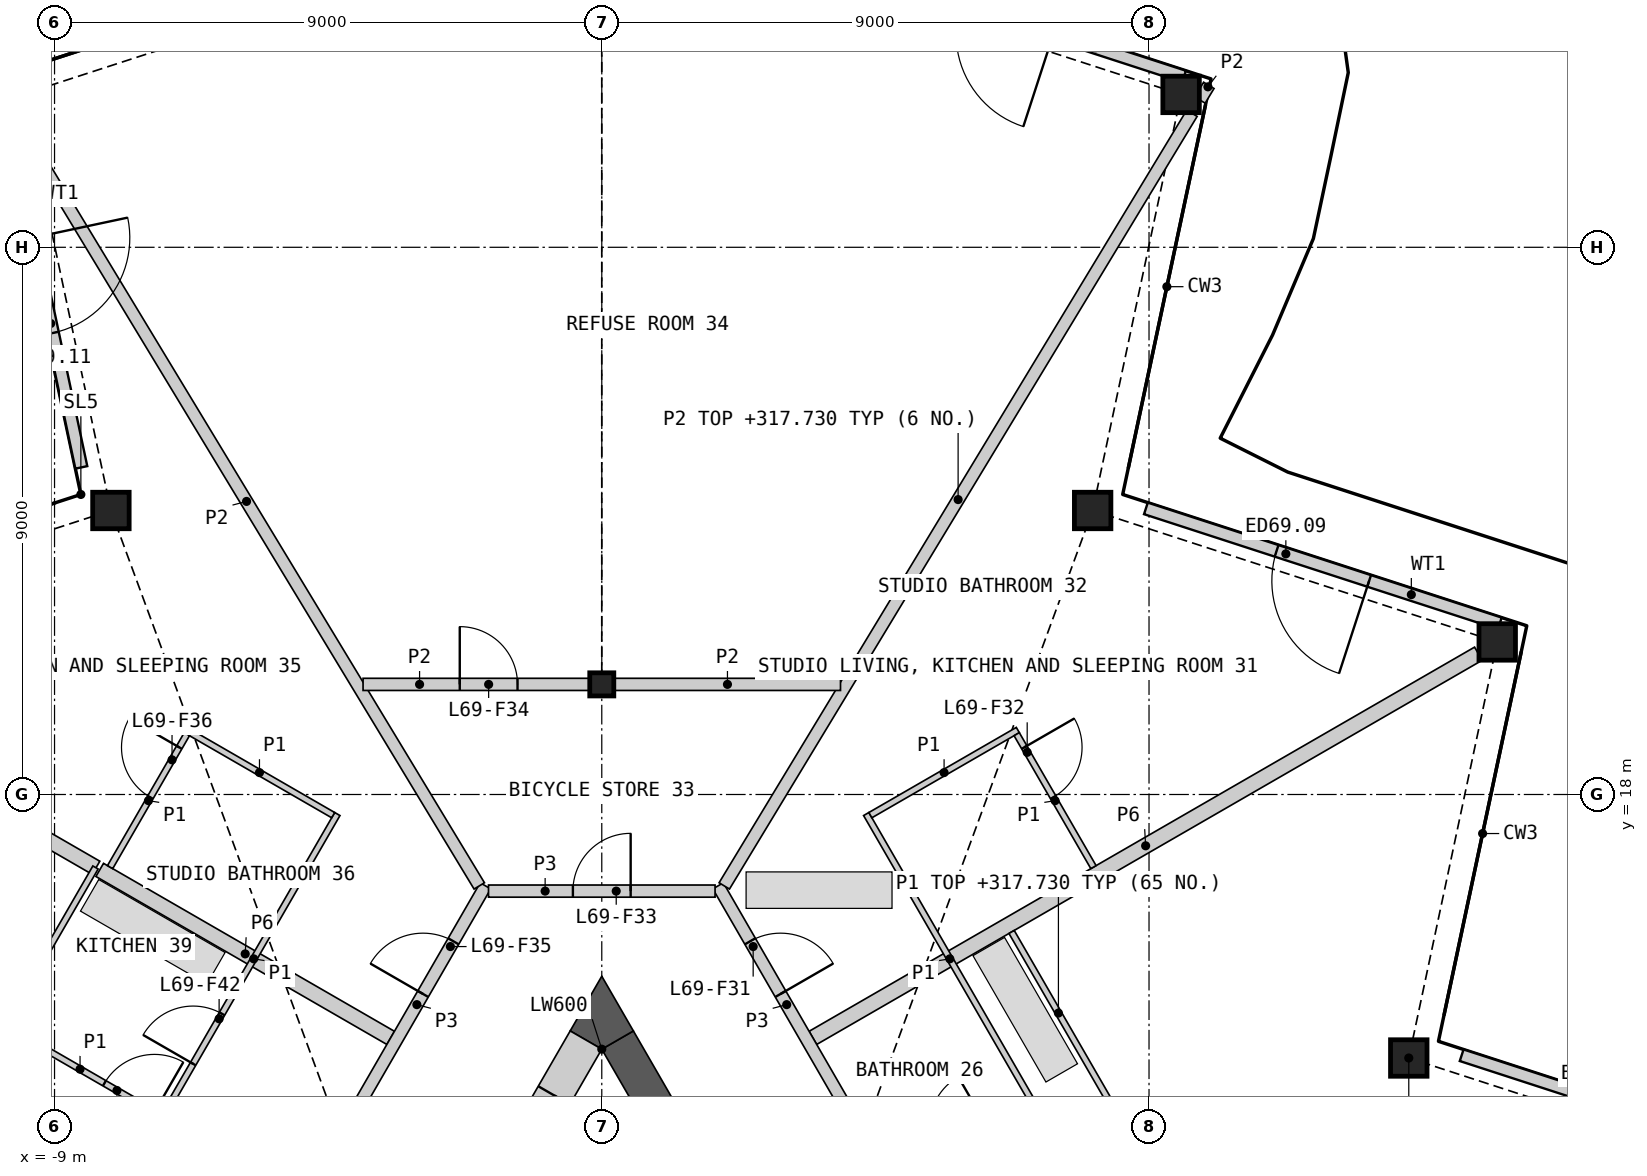
"""IFC4 building model, lengths in metres.
Left out: names, types, materials, properties, quantities, classifications, styles, units other than length and angle.
Written with IfcOpenShell. Run it as: python <this file> out.ifc"""

import sys

from ifc_helpers import new_model, si_unit, direction, frame, frame_2d, origin, origin_2d, place, context, subcontext, project, spatial, polyline, rectangle, hollow_rectangle, i_section, outline, extrude, element, fill, save


model = new_model("IFC4")
c1 = context("Model", 3, precision=1e-05, world=origin(), true_north=direction((0.0, 1.0)))
c2 = subcontext(c1, "Body", "Model", "MODEL_VIEW")
j1 = project(units=[si_unit("LENGTHUNIT", "METRE"), si_unit("PLANEANGLEUNIT", "RADIAN")], contexts=[c1])
p1 = place(None, origin())
s1 = spatial("IfcSite", under=j1, at=p1, CompositionType="ELEMENT")
p2 = place(p1, origin())
s2 = spatial("IfcBuilding", under=s1, at=p2, CompositionType="ELEMENT")
p3 = place(p2, frame((0.0, 0.0, 315.4)))
s3 = spatial("IfcBuildingStorey", under=s2, at=p3, CompositionType="ELEMENT", Elevation=315.4)
for number, where, z_axis, x_axis in (
    (1, (13.272, 13.666, 0.0), (0.0, 0.0, 1.0), (1.0, 0.0, 0.0)),
    (2, (14.727, 20.509, 0.0), (0.0, 0.0, 1.0), (1.0, 0.0, 0.0)),
    (3, (8.073, 22.671, 0.0), (0.0, 0.0, 1.0), (1.0, 0.0, 0.0)),
    (4, (9.527, 29.514, 0.0), (0.0, 0.0, 1.0), (1.0, 0.0, 0.0)),
    (5, (-8.073, 22.671, 0.0), (0.0, 0.0, 1.0), (1.0, 0.0, 0.0)),
):
    element("IfcColumn", number, at=place(p3, frame(where, z_axis=z_axis, x_axis=x_axis)), inside=s3, PredefinedType="COLUMN", context=c2, shape_type="SweptSolid", body=[
        extrude(hollow_rectangle(XDim=0.6, YDim=0.6, WallThickness=0.04, at=origin_2d()), origin(), (0.0, 0.0, 1.0), 3.4),
    ])
p4 = place(p3, frame((0.0, 19.811, 0.0), z_axis=(0.0, 0.0, 1.0), x_axis=(1.0, 0.0, 0.0)))
e6 = element("IfcColumn", 6, at=p4, inside=s3, PredefinedType="COLUMN", context=c2, shape_type="SweptSolid", body=[
    extrude(i_section(OverallWidth=0.396, OverallDepth=0.381, WebThickness=0.019, FlangeThickness=0.03, at=origin_2d()), origin(), (0.0, 0.0, 1.0), 3.4),
])
p5 = place(p3, frame((19.962, 11.82, 0.0), z_axis=(0.0, 0.0, 1.0), x_axis=(-0.951053709789, 0.309025631781, 0.0)))
e7 = element("IfcWall", 7, at=p5, inside=s3, PredefinedType="SOLIDWALL", context=c2, shape_type="SweptSolid", body=[
    extrude(rectangle(XDim=6.12, YDim=0.2, at=frame_2d((3.06, 0.0))), origin(), (0.0, 0.0, 1.0), 2.488),
])
p6 = place(p5, frame((2.26, 0.0, 0.0)))
e8 = element("IfcOpeningElement", 8, at=p6, cuts=e7, PredefinedType="OPENING", context=c2, shape_type="SweptSolid", body=[
    extrude(rectangle(XDim=1.6, YDim=2.25, at=frame_2d((0.8, 1.125))), frame((0.0, 0.11, 0.0), z_axis=(0.0, -1.0, 0.0), x_axis=(1.0, 0.0, 0.0)), (0.0, 0.0, 1.0), 0.22),
])
p7 = place(p3, frame((14.769, 20.814, 0.0), z_axis=(0.0, 0.0, 1.0), x_axis=(-0.951069243123, 0.308977822483, 0.0)))
e9 = element("IfcWall", 9, at=p7, inside=s3, PredefinedType="SOLIDWALL", context=c2, shape_type="SweptSolid", body=[
    extrude(rectangle(XDim=6.12, YDim=0.2, at=frame_2d((3.06, 0.0))), origin(), (0.0, 0.0, 1.0), 2.488),
])
p8 = place(p7, frame((2.26, 0.0, 0.0)))
e10 = element("IfcOpeningElement", 10, at=p8, cuts=e9, PredefinedType="OPENING", context=c2, shape_type="SweptSolid", body=[
    extrude(rectangle(XDim=1.6, YDim=2.25, at=frame_2d((0.8, 1.125))), frame((0.0, 0.11, 0.0), z_axis=(0.0, -1.0, 0.0), x_axis=(1.0, 0.0, 0.0)), (0.0, 0.0, 1.0), 0.22),
])
p9 = place(p3, frame((9.576, 29.809, 0.0), z_axis=(0.0, 0.0, 1.0), x_axis=(-0.951053709789, 0.309025631781, 0.0)))
e11 = element("IfcWall", 11, at=p9, inside=s3, PredefinedType="SOLIDWALL", context=c2, shape_type="SweptSolid", body=[
    extrude(rectangle(XDim=6.12, YDim=0.2, at=frame_2d((3.06, 0.0))), origin(), (0.0, 0.0, 1.0), 2.488),
])
p10 = place(p9, frame((2.26, 0.0, 0.0)))
e12 = element("IfcOpeningElement", 12, at=p10, cuts=e11, PredefinedType="OPENING", context=c2, shape_type="SweptSolid", body=[
    extrude(rectangle(XDim=1.6, YDim=2.25, at=frame_2d((0.8, 1.125))), frame((0.0, 0.11, 0.0), z_axis=(0.0, -1.0, 0.0), x_axis=(1.0, 0.0, 0.0)), (0.0, 0.0, 1.0), 0.22),
])
p11 = place(p3, frame((-9.832, 29.366, 0.0), z_axis=(0.0, 0.0, 1.0), x_axis=(0.207932234858, -0.978143233738, 0.0)))
e13 = element("IfcWall", 13, at=p11, inside=s3, PredefinedType="SOLIDWALL", context=c2, shape_type="SweptSolid", body=[
    extrude(rectangle(XDim=6.12, YDim=0.2, at=frame_2d((3.06, 0.0))), origin(), (0.0, 0.0, 1.0), 2.488),
])
p12 = place(p11, frame((2.26, 0.0, 0.0)))
e14 = element("IfcOpeningElement", 14, at=p12, cuts=e13, PredefinedType="OPENING", context=c2, shape_type="SweptSolid", body=[
    extrude(rectangle(XDim=1.6, YDim=2.25, at=frame_2d((0.8, 1.125))), frame((0.0, 0.11, 0.0), z_axis=(0.0, -1.0, 0.0), x_axis=(1.0, 0.0, 0.0)), (0.0, 0.0, 1.0), 0.22),
])
p13 = place(p3, frame((2.361, 10.322, 0.0), z_axis=(0.0, 0.0, 1.0), x_axis=(-0.500000735859, 0.866024978935, 0.0)))
e15 = element("IfcWall", 15, at=p13, inside=s3, PredefinedType="SHEAR", context=c2, shape_type="SweptSolid", body=[
    extrude(rectangle(XDim=4.202, YDim=0.6, at=frame_2d((2.101, 0.0))), origin(), (0.0, 0.0, 1.0), 3.1),
])
p14 = place(p3, origin())
e16 = element("IfcWall", 16, at=p14, inside=s3, PredefinedType="SHEAR", context=c2, shape_type="SweptSolid", body=[
    extrude(outline(polyline([(0.0, 13.811), (-0.52, 14.111), (0.0, 15.011), (0.52, 14.111), (0.0, 13.811)])), origin(), (0.0, 0.0, 1.0), 3.1),
])
p15 = place(p3, frame((-0.26, 13.961, 0.0), z_axis=(0.0, 0.0, 1.0), x_axis=(-0.49997936161, -0.866037319036, 0.0)))
e17 = element("IfcWall", 17, at=p15, inside=s3, PredefinedType="SHEAR", context=c2, shape_type="SweptSolid", body=[
    extrude(rectangle(XDim=2.66, YDim=0.6, at=frame_2d((1.33, 0.0))), origin(), (0.0, 0.0, 1.0), 3.1),
])
p16 = place(p15, frame((1.05, 0.0, 0.0)))
e18 = element("IfcOpeningElement", 18, at=p16, cuts=e17, PredefinedType="OPENING", context=c2, shape_type="SweptSolid", body=[
    extrude(rectangle(XDim=1.0, YDim=2.1, at=frame_2d((0.5, 1.05))), frame((0.0, 0.31, 0.0), z_axis=(0.0, -1.0, 0.0), x_axis=(1.0, 0.0, 0.0)), (0.0, 0.0, 1.0), 0.62),
])
p17 = place(p3, frame((3.472, 13.997, 0.0), z_axis=(0.0, 0.0, 1.0), x_axis=(0.866029233976, 0.499993365855, 0.0)))
e19 = element("IfcWall", 19, at=p17, inside=s3, PredefinedType="PARTITIONING", context=c2, shape_type="SweptSolid", body=[
    extrude(rectangle(XDim=12.637, YDim=0.25, at=frame_2d((6.319, 0.0))), origin(), (0.0, 0.0, 1.0), 2.33),
])
p18 = place(p3, frame((-14.417, 20.316, 0.0), z_axis=(0.0, 0.0, 1.0), x_axis=(0.866022207469, -0.50000553614, 0.0)))
e20 = element("IfcWall", 20, at=p18, inside=s3, PredefinedType="PARTITIONING", context=c2, shape_type="SweptSolid", body=[
    extrude(rectangle(XDim=7.042, YDim=0.25, at=frame_2d((3.521, 0.0))), origin(), (0.0, 0.0, 1.0), 2.33),
])
p19 = place(p3, frame((-8.257, 16.76, 0.0), z_axis=(0.0, 0.0, 1.0), x_axis=(0.866034739526, -0.499983829672, 0.0)))
e21 = element("IfcWall", 21, at=p19, inside=s3, PredefinedType="PARTITIONING", context=c2, shape_type="SweptSolid", body=[
    extrude(rectangle(XDim=5.525, YDim=0.25, at=frame_2d((2.763, 0.0))), origin(), (0.0, 0.0, 1.0), 2.33),
])
p20 = place(p3, frame((1.913, 16.498, 0.0), z_axis=(0.0, 0.0, 1.0), x_axis=(0.499950370306, -0.866054055606, 0.0)))
e22 = element("IfcWall", 22, at=p20, inside=s3, PredefinedType="PARTITIONING", context=c2, shape_type="SweptSolid", body=[
    extrude(rectangle(XDim=4.513, YDim=0.2, at=frame_2d((2.256, 0.0))), origin(), (0.0, 0.0, 1.0), 3.1),
])
p21 = place(p20, frame((1.053, 0.0, 0.0)))
e23 = element("IfcOpeningElement", 23, at=p21, cuts=e22, PredefinedType="OPENING", context=c2, shape_type="SweptSolid", body=[
    extrude(rectangle(XDim=1.0, YDim=2.1, at=frame_2d((0.5, 1.05))), frame((0.0, 0.11, 0.0), z_axis=(0.0, -1.0, 0.0), x_axis=(1.0, 0.0, 0.0)), (0.0, 0.0, 1.0), 0.22),
])
p22 = place(p3, frame((-4.169, 12.59, 0.0), z_axis=(0.0, 0.0, 1.0), x_axis=(0.499950370306, 0.866054055606, 0.0)))
e24 = element("IfcWall", 24, at=p22, inside=s3, PredefinedType="PARTITIONING", context=c2, shape_type="SweptSolid", body=[
    extrude(rectangle(XDim=4.513, YDim=0.2, at=frame_2d((2.256, 0.0))), origin(), (0.0, 0.0, 1.0), 3.1),
])
p23 = place(p22, frame((2.459, 0.0, 0.0)))
e25 = element("IfcOpeningElement", 25, at=p23, cuts=e24, PredefinedType="OPENING", context=c2, shape_type="SweptSolid", body=[
    extrude(rectangle(XDim=1.0, YDim=2.1, at=frame_2d((0.5, 1.05))), frame((0.0, 0.11, 0.0), z_axis=(0.0, -1.0, 0.0), x_axis=(1.0, 0.0, 0.0)), (0.0, 0.0, 1.0), 0.22),
])
p24 = place(p3, frame((-1.863, 16.411, 0.0), z_axis=(0.0, 0.0, 1.0), x_axis=(1.0, 0.0, 0.0)))
e26 = element("IfcWall", 26, at=p24, inside=s3, PredefinedType="PARTITIONING", context=c2, shape_type="SweptSolid", body=[
    extrude(rectangle(XDim=3.726, YDim=0.2, at=frame_2d((1.863, 0.0))), origin(), (0.0, 0.0, 1.0), 3.1),
])
p25 = place(p24, frame((1.388, 0.0, 0.0)))
e27 = element("IfcOpeningElement", 27, at=p25, cuts=e26, PredefinedType="OPENING", context=c2, shape_type="SweptSolid", body=[
    extrude(rectangle(XDim=0.95, YDim=2.1, at=frame_2d((0.475, 1.05))), frame((0.0, 0.11, 0.0), z_axis=(0.0, -1.0, 0.0), x_axis=(1.0, 0.0, 0.0)), (0.0, 0.0, 1.0), 0.22),
])
p26 = place(p3, frame((2.015, 16.497, 0.0), z_axis=(0.0, 0.0, 1.0), x_axis=(0.517779253395, 0.855514257482, 0.0)))
e28 = element("IfcWall", 28, at=p26, inside=s3, PredefinedType="PARTITIONING", context=c2, shape_type="SweptSolid", body=[
    extrude(rectangle(XDim=14.854, YDim=0.2, at=frame_2d((7.427, 0.0))), origin(), (0.0, 0.0, 1.0), 2.33),
])
p27 = place(p3, frame((-9.669, 29.144, 0.0), z_axis=(0.0, 0.0, 1.0), x_axis=(0.517770554559, -0.85551952218, 0.0)))
e29 = element("IfcWall", 29, at=p27, inside=s3, PredefinedType="PARTITIONING", context=c2, shape_type="SweptSolid", body=[
    extrude(rectangle(XDim=14.784, YDim=0.2, at=frame_2d((7.392, 0.0))), origin(), (0.0, 0.0, 1.0), 2.33),
])
p28 = place(p3, frame((-3.926, 19.811, 0.0), z_axis=(0.0, 0.0, 1.0), x_axis=(1.0, 0.0, 0.0)))
e30 = element("IfcWall", 30, at=p28, inside=s3, PredefinedType="PARTITIONING", context=c2, shape_type="SweptSolid", body=[
    extrude(rectangle(XDim=3.718, YDim=0.2, at=frame_2d((1.859, 0.0))), origin(), (0.0, 0.0, 1.0), 2.33),
])
p29 = place(p28, frame((1.59, 0.0, 0.0)))
e31 = element("IfcOpeningElement", 31, at=p29, cuts=e30, PredefinedType="OPENING", context=c2, shape_type="SweptSolid", body=[
    extrude(rectangle(XDim=0.95, YDim=2.1, at=frame_2d((0.475, 1.05))), frame((0.0, 0.11, 0.0), z_axis=(0.0, -1.0, 0.0), x_axis=(1.0, 0.0, 0.0)), (0.0, 0.0, 1.0), 0.22),
])
p30 = place(p3, frame((0.208, 19.811, 0.0), z_axis=(0.0, 0.0, 1.0), x_axis=(1.0, 0.0, 0.0)))
e32 = element("IfcWall", 32, at=p30, inside=s3, PredefinedType="PARTITIONING", context=c2, shape_type="SweptSolid", body=[
    extrude(rectangle(XDim=3.718, YDim=0.2, at=frame_2d((1.859, 0.0))), origin(), (0.0, 0.0, 1.0), 2.33),
])
p31 = place(p3, frame((9.837, 29.422, 0.0), z_axis=(0.0, 0.0, 1.0), x_axis=(0.517419338909, 0.855731983581, 0.0)))
e33 = element("IfcWall", 33, at=p31, inside=s3, PredefinedType="PARTITIONING", context=c2, shape_type="SweptSolid", body=[
    extrude(rectangle(XDim=0.282, YDim=0.2, at=frame_2d((0.141, 0.0))), origin(), (0.0, 0.0, 1.0), 2.33),
])
p32 = place(p3, frame((6.74, 15.739, 0.0), z_axis=(0.0, 0.0, 1.0), x_axis=(0.499995022685, -0.86602827742, 0.0)))
e34 = element("IfcWall", 34, at=p32, inside=s3, PredefinedType="PARTITIONING", context=c2, shape_type="SweptSolid", body=[
    extrude(rectangle(XDim=15.404, YDim=0.1, at=frame_2d((7.702, 0.0))), origin(), (0.0, 0.0, 1.0), 2.33),
])
p33 = place(p32, frame((8.582, 0.0, 0.0)))
e35 = element("IfcOpeningElement", 35, at=p33, cuts=e34, PredefinedType="OPENING", context=c2, shape_type="SweptSolid", body=[
    extrude(rectangle(XDim=0.95, YDim=2.1, at=frame_2d((0.475, 1.05))), frame((0.0, 0.06, 0.0), z_axis=(0.0, -1.0, 0.0), x_axis=(1.0, 0.0, 0.0)), (0.0, 0.0, 1.0), 0.12),
])
p34 = place(p3, frame((-13.544, 7.762, 0.0), z_axis=(0.0, 0.0, 1.0), x_axis=(0.499993819111, 0.866028972293, 0.0)))
e36 = element("IfcWall", 36, at=p34, inside=s3, PredefinedType="PARTITIONING", context=c2, shape_type="SweptSolid", body=[
    extrude(rectangle(XDim=10.436, YDim=0.1, at=frame_2d((5.218, 0.0))), origin(), (0.0, 0.0, 1.0), 2.33),
])
p35 = place(p34, frame((3.279, 0.0, 0.0)))
e37 = element("IfcOpeningElement", 37, at=p35, cuts=e36, PredefinedType="OPENING", context=c2, shape_type="SweptSolid", body=[
    extrude(rectangle(XDim=0.95, YDim=2.1, at=frame_2d((0.475, 1.05))), frame((0.0, 0.06, 0.0), z_axis=(0.0, -1.0, 0.0), x_axis=(1.0, 0.0, 0.0)), (0.0, 0.0, 1.0), 0.12),
])
p36 = place(p3, frame((-9.783, 14.177, 0.0), z_axis=(0.0, 0.0, 1.0), x_axis=(0.866030435321, -0.499991285022, 0.0)))
e38 = element("IfcWall", 38, at=p36, inside=s3, PredefinedType="PARTITIONING", context=c2, shape_type="SweptSolid", body=[
    extrude(rectangle(XDim=5.555, YDim=0.1, at=frame_2d((2.778, 0.0))), origin(), (0.0, 0.0, 1.0), 2.33),
])
p37 = place(p36, frame((1.852, 0.0, 0.0)))
e39 = element("IfcOpeningElement", 39, at=p37, cuts=e38, PredefinedType="OPENING", context=c2, shape_type="SweptSolid", body=[
    extrude(rectangle(XDim=0.95, YDim=2.1, at=frame_2d((0.475, 1.05))), frame((0.0, 0.06, 0.0), z_axis=(0.0, -1.0, 0.0), x_axis=(1.0, 0.0, 0.0)), (0.0, 0.0, 1.0), 0.12),
])
p38 = place(p3, frame((4.349, 17.679, 0.0), z_axis=(0.0, 0.0, 1.0), x_axis=(0.49997732567, -0.866038494419, 0.0)))
e40 = element("IfcWall", 40, at=p38, inside=s3, PredefinedType="PARTITIONING", context=c2, shape_type="SweptSolid", body=[
    extrude(rectangle(XDim=5.5, YDim=0.1, at=frame_2d((2.75, 0.0))), origin(), (0.0, 0.0, 1.0), 2.33),
])
p39 = place(p3, frame((-7.099, 12.915, 0.0), z_axis=(0.0, 0.0, 1.0), x_axis=(0.49997732567, 0.866038494419, 0.0)))
e41 = element("IfcWall", 41, at=p39, inside=s3, PredefinedType="PARTITIONING", context=c2, shape_type="SweptSolid", body=[
    extrude(rectangle(XDim=5.5, YDim=0.1, at=frame_2d((2.75, 0.0))), origin(), (0.0, 0.0, 1.0), 2.33),
])
p40 = place(p39, frame((0.756, 0.0, 0.0)))
e42 = element("IfcOpeningElement", 42, at=p40, cuts=e41, PredefinedType="OPENING", context=c2, shape_type="SweptSolid", body=[
    extrude(rectangle(XDim=0.95, YDim=2.1, at=frame_2d((0.475, 1.05))), frame((0.0, 0.06, 0.0), z_axis=(0.0, -1.0, 0.0), x_axis=(1.0, 0.0, 0.0)), (0.0, 0.0, 1.0), 0.12),
])
for number, where, z_axis, x_axis in (
    (43, (4.417, 17.66, 0.0), (0.0, 0.0, 1.0), (0.866, 0.5, 0.0)),
    (44, (-6.842, 19.06, 0.0), (0.0, 0.0, 1.0), (0.866, -0.5, 0.0)),
):
    element("IfcWall", number, at=place(p3, frame(where, z_axis=z_axis, x_axis=x_axis)), inside=s3, PredefinedType="PARTITIONING", context=c2, shape_type="SweptSolid", body=[
        extrude(rectangle(XDim=2.8, YDim=0.1, at=frame_2d((1.4, 0.0))), origin(), (0.0, 0.0, 1.0), 2.33),
    ])
p41 = place(p3, frame((6.824, 18.992, 0.0), z_axis=(0.0, 0.0, 1.0), x_axis=(0.50001820224, -0.866014894461, 0.0)))
e45 = element("IfcWall", 45, at=p41, inside=s3, PredefinedType="PARTITIONING", context=c2, shape_type="SweptSolid", body=[
    extrude(rectangle(XDim=2.525, YDim=0.1, at=frame_2d((1.262, 0.0))), origin(), (0.0, 0.0, 1.0), 2.33),
])
p42 = place(p41, frame((0.25, 0.0, 0.0)))
e46 = element("IfcOpeningElement", 46, at=p42, cuts=e45, PredefinedType="OPENING", context=c2, shape_type="SweptSolid", body=[
    extrude(rectangle(XDim=0.95, YDim=2.1, at=frame_2d((0.475, 1.05))), frame((0.0, 0.06, 0.0), z_axis=(0.0, -1.0, 0.0), x_axis=(1.0, 0.0, 0.0)), (0.0, 0.0, 1.0), 0.12),
])
p43 = place(p3, frame((-8.086, 16.805, 0.0), z_axis=(0.0, 0.0, 1.0), x_axis=(0.50001820224, 0.866014894461, 0.0)))
e47 = element("IfcWall", 47, at=p43, inside=s3, PredefinedType="PARTITIONING", context=c2, shape_type="SweptSolid", body=[
    extrude(rectangle(XDim=2.525, YDim=0.1, at=frame_2d((1.262, 0.0))), origin(), (0.0, 0.0, 1.0), 2.33),
])
p44 = place(p43, frame((1.325, 0.0, 0.0)))
e48 = element("IfcOpeningElement", 48, at=p44, cuts=e47, PredefinedType="OPENING", context=c2, shape_type="SweptSolid", body=[
    extrude(rectangle(XDim=0.95, YDim=2.1, at=frame_2d((0.475, 1.05))), frame((0.0, 0.06, 0.0), z_axis=(0.0, -1.0, 0.0), x_axis=(1.0, 0.0, 0.0)), (0.0, 0.0, 1.0), 0.12),
])
p45 = place(p8, origin())
e49 = element("IfcDoor", 49, at=p45, inside=s3, OperationType="DOUBLE_DOOR_SINGLE_SWING", PredefinedType="DOOR", context=c2, shape_type="SweptSolid", body=[
    extrude(rectangle(XDim=1.6, YDim=2.25, at=frame_2d((0.8, 1.125))), frame((0.0, 0.025, 0.0), z_axis=(0.0, -1.0, 0.0), x_axis=(1.0, 0.0, 0.0)), (0.0, 0.0, 1.0), 0.05),
])
fill(e10, e49)
p46 = place(p12, origin())
e50 = element("IfcDoor", 50, at=p46, inside=s3, OperationType="DOUBLE_DOOR_SINGLE_SWING", PredefinedType="DOOR", context=c2, shape_type="SweptSolid", body=[
    extrude(rectangle(XDim=1.6, YDim=2.25, at=frame_2d((0.8, 1.125))), frame((0.0, 0.025, 0.0), z_axis=(0.0, -1.0, 0.0), x_axis=(1.0, 0.0, 0.0)), (0.0, 0.0, 1.0), 0.05),
])
fill(e14, e50)
p47 = place(p21, origin())
e51 = element("IfcDoor", 51, at=p47, inside=s3, OperationType="SINGLE_SWING_RIGHT", PredefinedType="DOOR", context=c2, shape_type="SweptSolid", body=[
    extrude(rectangle(XDim=1.0, YDim=2.1, at=frame_2d((0.5, 1.05))), frame((0.0, 0.025, 0.0), z_axis=(0.0, -1.0, 0.0), x_axis=(1.0, 0.0, 0.0)), (0.0, 0.0, 1.0), 0.05),
])
fill(e23, e51)
p48 = place(p42, origin())
e52 = element("IfcDoor", 52, at=p48, inside=s3, OperationType="SINGLE_SWING_LEFT", PredefinedType="DOOR", context=c2, shape_type="SweptSolid", body=[
    extrude(rectangle(XDim=0.95, YDim=2.1, at=frame_2d((0.475, 1.05))), frame((0.0, 0.025, 0.0), z_axis=(0.0, -1.0, 0.0), x_axis=(1.0, 0.0, 0.0)), (0.0, 0.0, 1.0), 0.05),
])
fill(e46, e52)
p49 = place(p25, origin())
e53 = element("IfcDoor", 53, at=p49, inside=s3, OperationType="SINGLE_SWING_RIGHT", PredefinedType="DOOR", context=c2, shape_type="SweptSolid", body=[
    extrude(rectangle(XDim=0.95, YDim=2.1, at=frame_2d((0.475, 1.05))), frame((0.0, 0.025, 0.0), z_axis=(0.0, -1.0, 0.0), x_axis=(1.0, 0.0, 0.0)), (0.0, 0.0, 1.0), 0.05),
])
fill(e27, e53)
p50 = place(p29, origin())
e54 = element("IfcDoor", 54, at=p50, inside=s3, OperationType="SINGLE_SWING_LEFT", PredefinedType="DOOR", context=c2, shape_type="SweptSolid", body=[
    extrude(rectangle(XDim=0.95, YDim=2.1, at=frame_2d((0.475, 1.05))), frame((0.0, 0.025, 0.0), z_axis=(0.0, -1.0, 0.0), x_axis=(1.0, 0.0, 0.0)), (0.0, 0.0, 1.0), 0.05),
])
fill(e31, e54)
p51 = place(p23, origin())
e55 = element("IfcDoor", 55, at=p51, inside=s3, OperationType="SINGLE_SWING_LEFT", PredefinedType="DOOR", context=c2, shape_type="SweptSolid", body=[
    extrude(rectangle(XDim=1.0, YDim=2.1, at=frame_2d((0.5, 1.05))), frame((0.0, 0.025, 0.0), z_axis=(0.0, -1.0, 0.0), x_axis=(1.0, 0.0, 0.0)), (0.0, 0.0, 1.0), 0.05),
])
fill(e25, e55)
p52 = place(p44, origin())
e56 = element("IfcDoor", 56, at=p52, inside=s3, OperationType="SINGLE_SWING_RIGHT", PredefinedType="DOOR", context=c2, shape_type="SweptSolid", body=[
    extrude(rectangle(XDim=0.95, YDim=2.1, at=frame_2d((0.475, 1.05))), frame((0.0, 0.025, 0.0), z_axis=(0.0, -1.0, 0.0), x_axis=(1.0, 0.0, 0.0)), (0.0, 0.0, 1.0), 0.05),
])
fill(e48, e56)
p53 = place(p37, origin())
e57 = element("IfcDoor", 57, at=p53, inside=s3, OperationType="SINGLE_SWING_RIGHT", PredefinedType="DOOR", context=c2, shape_type="SweptSolid", body=[
    extrude(rectangle(XDim=0.95, YDim=2.1, at=frame_2d((0.475, 1.05))), frame((0.0, 0.025, 0.0), z_axis=(0.0, -1.0, 0.0), x_axis=(1.0, 0.0, 0.0)), (0.0, 0.0, 1.0), 0.05),
])
fill(e39, e57)
p54 = place(p40, origin())
e58 = element("IfcDoor", 58, at=p54, inside=s3, OperationType="SINGLE_SWING_LEFT", PredefinedType="DOOR", context=c2, shape_type="SweptSolid", body=[
    extrude(rectangle(XDim=0.95, YDim=2.1, at=frame_2d((0.475, 1.05))), frame((0.0, 0.025, 0.0), z_axis=(0.0, -1.0, 0.0), x_axis=(1.0, 0.0, 0.0)), (0.0, 0.0, 1.0), 0.05),
])
fill(e42, e58)
save(model, sys.argv[1])
